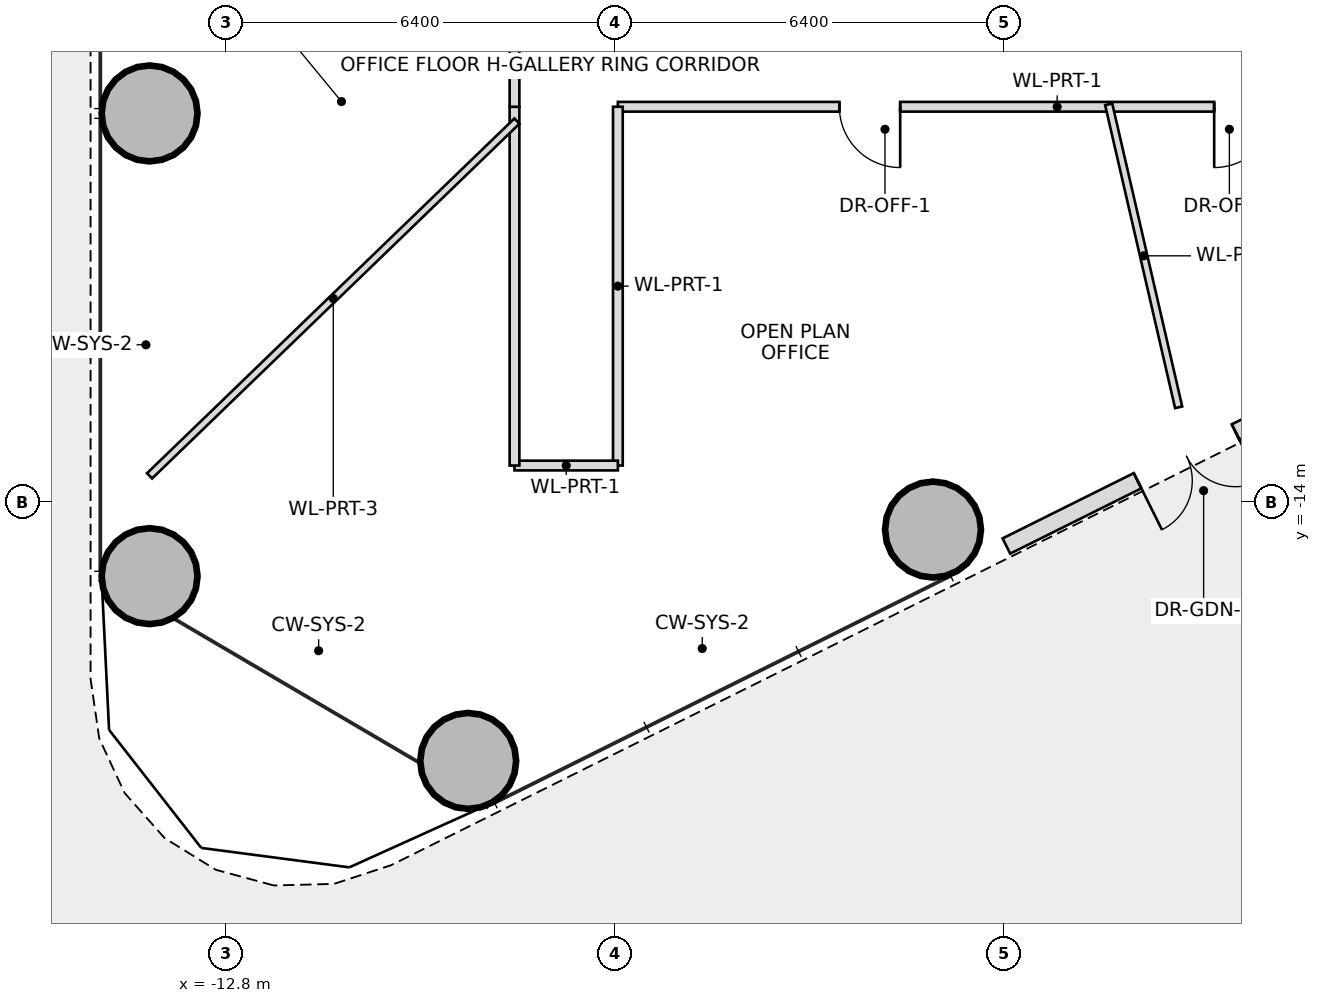
"""IFC4 building model, lengths in metres.
Left out: names, types, materials, properties, quantities, classifications, styles, units other than length and angle.
Written with IfcOpenShell. Run it as: python <this file> out.ifc"""

import sys

from ifc_helpers import new_model, si_unit, direction, frame, frame_2d, origin, origin_2d, place, context, subcontext, project, spatial, rectangle, hollow_circle, extrude, source, transform, mapped, element, fill, save


model = new_model("IFC4")
c1 = context("Model", 3, precision=1e-05, world=origin(), true_north=direction((0.0, 1.0)))
c2 = subcontext(c1, "Body", "Model", "MODEL_VIEW")
j1 = project(units=[si_unit("LENGTHUNIT", "METRE"), si_unit("PLANEANGLEUNIT", "RADIAN")], contexts=[c1])
p1 = place(None, origin())
s1 = spatial("IfcSite", under=j1, at=p1, CompositionType="ELEMENT")
p2 = place(p1, origin())
s2 = spatial("IfcBuilding", under=s1, at=p2, CompositionType="ELEMENT")
p3 = place(p2, frame((0.0, 0.0, 20.1)))
s3 = spatial("IfcBuildingStorey", under=s2, at=p3, CompositionType="ELEMENT", Elevation=20.1)
m1 = source(origin(), c2, "Body", "SweptSolid", [
    extrude(hollow_circle(Radius=0.8, WallThickness=0.055, at=origin_2d()), origin(), (0.0, 0.0, 1.0), 4.02),
])
for number, where, z_axis, x_axis in (
    (1, (-8.812, -18.258, -0.32), (0.0, 0.0, 1.0), (1.0, 0.0, 0.0)),
    (2, (-1.167, -14.453, -0.32), (0.0, 0.0, 1.0), (1.0, 0.0, 0.0)),
    (3, (-14.052, -7.61, -0.32), (0.0, 0.0, 1.0), (1.0, 0.0, 0.0)),
    (4, (-14.052, -15.219, -0.32), (0.0, 0.0, 1.0), (1.0, 0.0, 0.0)),
):
    element("IfcColumn", number, at=place(p3, frame(where, z_axis=z_axis, x_axis=x_axis)), inside=s3, PredefinedType="COLUMN", context=c2, shape_type="MappedRepresentation", body=[
        mapped(m1, transform((0.0, 0.0, 0.0), scale=1.0)),
    ])
p4 = place(p3, frame((5.966, -11.774, 0.0), z_axis=(0.0, 0.0, 1.0), x_axis=(-0.895251869384, -0.445560422798, 0.0)))
e5 = element("IfcWall", 5, at=p4, inside=s3, PredefinedType="SOLIDWALL", context=c2, shape_type="SweptSolid", body=[
    extrude(rectangle(XDim=6.619, YDim=0.28, at=frame_2d((3.31, 0.0))), origin(), (0.0, 0.0, 1.0), 2.915),
])
p5 = place(p4, frame((2.409, 0.0, 0.0)))
e6 = element("IfcOpeningElement", 6, at=p5, cuts=e5, PredefinedType="OPENING", context=c2, shape_type="SweptSolid", body=[
    extrude(rectangle(XDim=1.8, YDim=2.35, at=frame_2d((0.9, 1.175))), frame((0.0, 0.15, 0.0), z_axis=(0.0, -1.0, 0.0), x_axis=(1.0, 0.0, 0.0)), (0.0, 0.0, 1.0), 0.3),
])
p6 = place(p3, frame((6.35, -7.5, 0.0), z_axis=(0.0, 0.0, 1.0), x_axis=(-1.0, 0.0, 0.0)))
e7 = element("IfcWall", 7, at=p6, inside=s3, PredefinedType="PARTITIONING", context=c2, shape_type="SweptSolid", body=[
    extrude(rectangle(XDim=12.7, YDim=0.16, at=frame_2d((6.35, 0.0))), origin(), (0.0, 0.0, 1.0), 2.8),
])
p7 = place(p6, frame((1.893, 0.0, 0.0)))
e8 = element("IfcOpeningElement", 8, at=p7, cuts=e7, PredefinedType="OPENING", context=c2, shape_type="SweptSolid", body=[
    extrude(rectangle(XDim=1.0, YDim=2.25, at=frame_2d((0.5, 1.125))), frame((0.0, 0.09, 0.0), z_axis=(0.0, -1.0, 0.0), x_axis=(1.0, 0.0, 0.0)), (0.0, 0.0, 1.0), 0.18),
])
p8 = place(p6, frame((8.057, 0.0, 0.0)))
e9 = element("IfcOpeningElement", 9, at=p8, cuts=e7, PredefinedType="OPENING", context=c2, shape_type="SweptSolid", body=[
    extrude(rectangle(XDim=1.0, YDim=2.25, at=frame_2d((0.5, 1.125))), frame((0.0, 0.09, 0.0), z_axis=(0.0, -1.0, 0.0), x_axis=(1.0, 0.0, 0.0)), (0.0, 0.0, 1.0), 0.18),
])
p9 = place(p3, frame((-6.35, -7.5, 0.0), z_axis=(0.0, 0.0, 1.0), x_axis=(0.0, -1.0, 0.0)))
e10 = element("IfcWall", 10, at=p9, inside=s3, PredefinedType="PARTITIONING", context=c2, shape_type="SweptSolid", body=[
    extrude(rectangle(XDim=5.9, YDim=0.16, at=frame_2d((2.95, 0.0))), origin(), (0.0, 0.0, 1.0), 2.8),
])
p10 = place(p3, frame((-6.35, -13.4, 0.0), z_axis=(0.0, 0.0, 1.0), x_axis=(-1.0, 0.0, 0.0)))
e11 = element("IfcWall", 11, at=p10, inside=s3, PredefinedType="PARTITIONING", context=c2, shape_type="SweptSolid", body=[
    extrude(rectangle(XDim=1.7, YDim=0.16, at=frame_2d((0.85, 0.0))), origin(), (0.0, 0.0, 1.0), 2.8),
])
p11 = place(p3, frame((-8.05, -13.4, 0.0), z_axis=(0.0, 0.0, 1.0), x_axis=(0.0, 1.0, 0.0)))
e12 = element("IfcWall", 12, at=p11, inside=s3, PredefinedType="PARTITIONING", context=c2, shape_type="SweptSolid", body=[
    extrude(rectangle(XDim=5.9, YDim=0.16, at=frame_2d((2.95, 0.0))), origin(), (0.0, 0.0, 1.0), 2.8),
])
p12 = place(p3, frame((-8.05, -7.5, 0.0), z_axis=(0.0, 0.0, 1.0), x_axis=(0.0, 1.0, 0.0)))
e13 = element("IfcWall", 13, at=p12, inside=s3, PredefinedType="PARTITIONING", context=c2, shape_type="SweptSolid", body=[
    extrude(rectangle(XDim=15.0, YDim=0.16, at=frame_2d((7.5, 0.0))), origin(), (0.0, 0.0, 1.0), 2.8),
])
p13 = place(p12, frame((7.0, 0.0, 0.0)))
e14 = element("IfcOpeningElement", 14, at=p13, cuts=e13, PredefinedType="OPENING", context=c2, shape_type="SweptSolid", body=[
    extrude(rectangle(XDim=1.0, YDim=2.25, at=frame_2d((0.5, 1.125))), frame((0.0, 0.09, 0.0), z_axis=(0.0, -1.0, 0.0), x_axis=(1.0, 0.0, 0.0)), (0.0, 0.0, 1.0), 0.18),
])
p14 = place(p3, frame((-8.01, -7.735, 0.0), z_axis=(0.0, 0.0, 1.0), x_axis=(-0.719337851146, -0.694660388902, 0.0)))
e15 = element("IfcWall", 15, at=p14, inside=s3, PredefinedType="PARTITIONING", context=c2, shape_type="SweptSolid", body=[
    extrude(rectangle(XDim=8.399, YDim=0.12, at=frame_2d((4.2, 0.0))), origin(), (0.0, 0.0, 1.0), 2.8),
])
p15 = place(p3, frame((1.722, -7.46, 0.0), z_axis=(0.0, 0.0, 1.0), x_axis=(0.224925758796, -0.974375904377, 0.0)))
e16 = element("IfcWall", 16, at=p15, inside=s3, PredefinedType="PARTITIONING", context=c2, shape_type="SweptSolid", body=[
    extrude(rectangle(XDim=5.114, YDim=0.12, at=frame_2d((2.557, 0.0))), origin(), (0.0, 0.0, 1.0), 2.96),
])
p16 = place(p5, origin())
e17 = element("IfcDoor", 17, at=p16, inside=s3, OperationType="DOUBLE_DOOR_SINGLE_SWING", PredefinedType="DOOR", context=c2, shape_type="SweptSolid", body=[
    extrude(rectangle(XDim=1.8, YDim=2.35, at=frame_2d((0.9, 1.175))), frame((0.0, 0.025, 0.0), z_axis=(0.0, -1.0, 0.0), x_axis=(1.0, 0.0, 0.0)), (0.0, 0.0, 1.0), 0.05),
])
fill(e6, e17)
p17 = place(p7, origin())
e18 = element("IfcDoor", 18, at=p17, inside=s3, OperationType="SINGLE_SWING_RIGHT", PredefinedType="DOOR", context=c2, shape_type="SweptSolid", body=[
    extrude(rectangle(XDim=1.0, YDim=2.25, at=frame_2d((0.5, 1.125))), frame((0.0, 0.025, 0.0), z_axis=(0.0, -1.0, 0.0), x_axis=(1.0, 0.0, 0.0)), (0.0, 0.0, 1.0), 0.05),
])
fill(e8, e18)
p18 = place(p8, origin())
e19 = element("IfcDoor", 19, at=p18, inside=s3, OperationType="SINGLE_SWING_LEFT", PredefinedType="DOOR", context=c2, shape_type="SweptSolid", body=[
    extrude(rectangle(XDim=1.0, YDim=2.25, at=frame_2d((0.5, 1.125))), frame((0.0, 0.025, 0.0), z_axis=(0.0, -1.0, 0.0), x_axis=(1.0, 0.0, 0.0)), (0.0, 0.0, 1.0), 0.05),
])
fill(e9, e19)
save(model, sys.argv[1])
